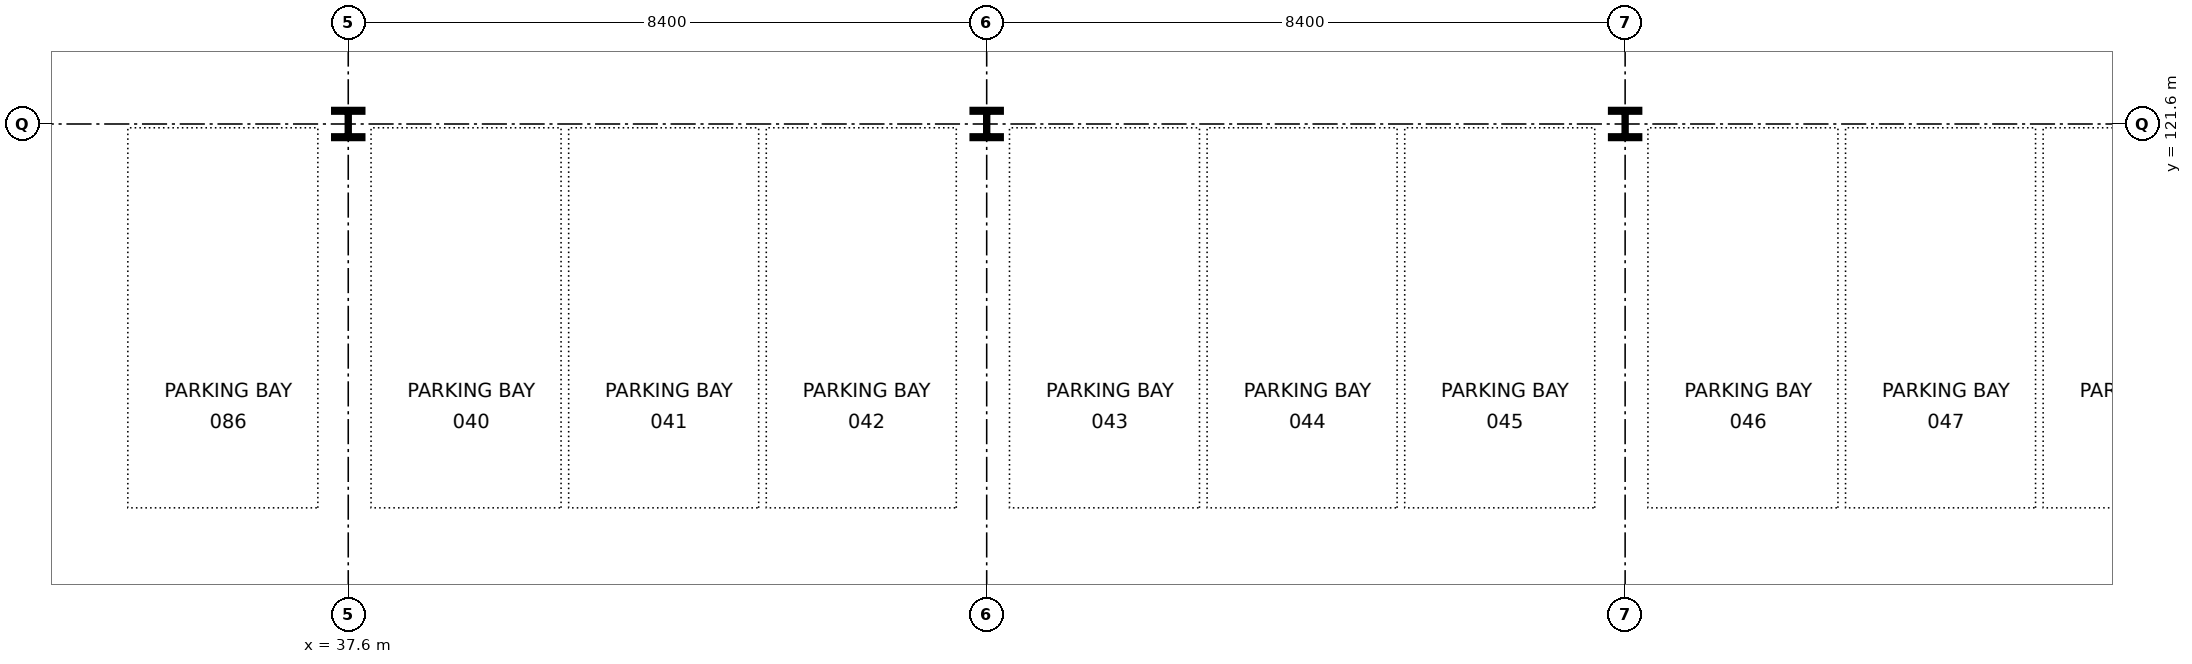
"""IFC4 building model, lengths in metres.
Left out: names, types, materials, properties, quantities, classifications, styles, units other than length and angle.
Written with IfcOpenShell. Run it as: python <this file> out.ifc"""

import sys

from ifc_helpers import new_model, si_unit, direction, frame, origin, origin_2d, place, context, subcontext, project, spatial, i_section, extrude, element, save


model = new_model("IFC4")
c1 = context("Model", 3, precision=1e-05, world=origin(), true_north=direction((0.0, 1.0)))
c2 = subcontext(c1, "Body", "Model", "MODEL_VIEW")
j1 = project(units=[si_unit("LENGTHUNIT", "METRE"), si_unit("PLANEANGLEUNIT", "RADIAN")], contexts=[c1])
p1 = place(None, origin())
s1 = spatial("IfcSite", under=j1, at=p1, CompositionType="ELEMENT")
p2 = place(p1, origin())
s2 = spatial("IfcBuilding", under=s1, at=p2, CompositionType="ELEMENT")
p3 = place(p2, frame((0.0, 0.0, -4.6)))
s3 = spatial("IfcBuildingStorey", under=s2, at=p3, CompositionType="ELEMENT", Elevation=-4.6)
for number, where, z_axis, x_axis in (
    (1, (54.4, 121.6, 0.0), (0.0, 0.0, 1.0), (1.0, 0.0, 0.0)),
    (2, (37.6, 121.6, 0.0), (0.0, 0.0, 1.0), (1.0, 0.0, 0.0)),
    (3, (46.0, 121.6, 0.0), (0.0, 0.0, 1.0), (1.0, 0.0, 0.0)),
):
    element("IfcColumn", number, at=place(p3, frame(where, z_axis=z_axis, x_axis=x_axis)), inside=s3, PredefinedType="COLUMN", context=c2, shape_type="SweptSolid", body=[
        extrude(i_section(OverallWidth=0.373, OverallDepth=0.373, WebThickness=0.016, FlangeThickness=0.026, FilletRadius=0.015, at=origin_2d()), origin(), (0.0, 0.0, 1.0), 4.6),
    ])
save(model, sys.argv[1])
